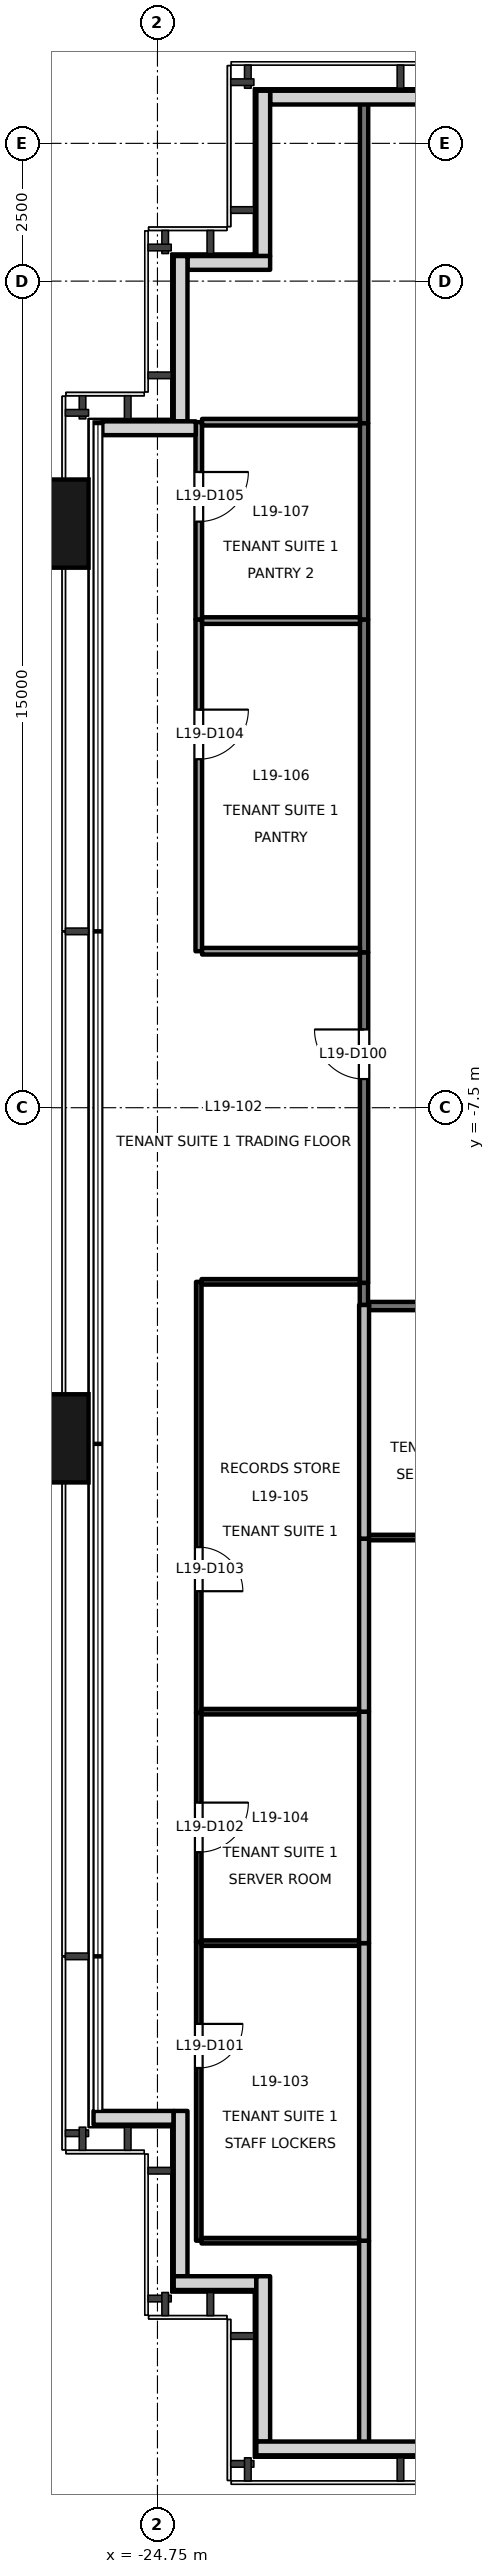
"""IFC4 building model, lengths in metres.
Left out: names, types, materials, properties, quantities, classifications, styles, units other than length and angle.
Written with IfcOpenShell. Run it as: python <this file> out.ifc"""

import sys

from ifc_helpers import new_model, si_unit, direction, frame, frame_2d, origin, origin_2d, place, context, subcontext, project, spatial, rectangle, extrude, element, fill, save


model = new_model("IFC4")
c1 = context("Model", 3, precision=1e-05, world=origin(), true_north=direction((0.0, 1.0)))
c2 = subcontext(c1, "Body", "Model", "MODEL_VIEW")
j1 = project(units=[si_unit("LENGTHUNIT", "METRE"), si_unit("PLANEANGLEUNIT", "RADIAN")], contexts=[c1])
p1 = place(None, origin())
s1 = spatial("IfcSite", under=j1, at=p1, CompositionType="ELEMENT")
p2 = place(p1, origin())
s2 = spatial("IfcBuilding", under=s1, at=p2, CompositionType="ELEMENT")
p3 = place(p2, frame((0.0, 0.0, 87.7)))
s3 = spatial("IfcBuildingStorey", under=s2, at=p3, CompositionType="ELEMENT", Elevation=87.7)
for number, where, z_axis, x_axis in (
    (1, (-26.9, -13.5, -0.2), (0.0, 0.0, 1.0), (0.0, 1.0, 0.0)),
    (2, (-26.9, 3.1, -0.2), (0.0, 0.0, 1.0), (0.0, 1.0, 0.0)),
):
    element("IfcColumn", number, at=place(p3, frame(where, z_axis=z_axis, x_axis=x_axis)), inside=s3, PredefinedType="COLUMN", context=c2, shape_type="SweptSolid", body=[
        extrude(rectangle(XDim=1.6, YDim=1.8, at=origin_2d()), origin(), (0.0, 0.0, 1.0), 4.0),
    ])
p4 = place(p3, frame((-20.0, 10.83, 0.0), z_axis=(0.0, 0.0, 1.0), x_axis=(-1.0, 0.0, 0.0)))
e3 = element("IfcWall", 3, at=p4, inside=s3, PredefinedType="SOLIDWALL", context=c2, shape_type="SweptSolid", body=[
    extrude(rectangle(XDim=2.705, YDim=0.25, at=frame_2d((1.353, 0.0))), origin(), (0.0, 0.0, 1.0), 3.8),
])
p5 = place(p3, frame((-22.83, 10.955, 0.0), z_axis=(0.0, 0.0, 1.0), x_axis=(0.0, -1.0, 0.0)))
e4 = element("IfcWall", 4, at=p5, inside=s3, PredefinedType="SOLIDWALL", context=c2, shape_type="SweptSolid", body=[
    extrude(rectangle(XDim=3.0, YDim=0.25, at=frame_2d((1.5, 0.0))), origin(), (0.0, 0.0, 1.0), 3.8),
])
p6 = place(p3, frame((-22.705, 7.83, 0.0), z_axis=(0.0, 0.0, 1.0), x_axis=(-1.0, 0.0, 0.0)))
e5 = element("IfcWall", 5, at=p6, inside=s3, PredefinedType="SOLIDWALL", context=c2, shape_type="SweptSolid", body=[
    extrude(rectangle(XDim=1.5, YDim=0.25, at=frame_2d((0.75, 0.0))), origin(), (0.0, 0.0, 1.0), 3.8),
])
p7 = place(p3, frame((-24.33, 7.955, 0.0), z_axis=(0.0, 0.0, 1.0), x_axis=(0.0, -1.0, 0.0)))
e6 = element("IfcWall", 6, at=p7, inside=s3, PredefinedType="SOLIDWALL", context=c2, shape_type="SweptSolid", body=[
    extrude(rectangle(XDim=3.0, YDim=0.25, at=frame_2d((1.5, 0.0))), origin(), (0.0, 0.0, 1.0), 3.8),
])
p8 = place(p3, frame((-24.055, 4.83, 0.0), z_axis=(0.0, 0.0, 1.0), x_axis=(-1.0, 0.0, 0.0)))
e7 = element("IfcWall", 7, at=p8, inside=s3, PredefinedType="SOLIDWALL", context=c2, shape_type="SweptSolid", body=[
    extrude(rectangle(XDim=1.695, YDim=0.25, at=frame_2d((0.848, 0.0))), origin(), (0.0, 0.0, 1.0), 3.8),
])
p9 = place(p3, frame((-25.91, -25.83, 0.0), z_axis=(0.0, 0.0, 1.0), x_axis=(1.0, 0.0, 0.0)))
e8 = element("IfcWall", 8, at=p9, inside=s3, PredefinedType="SOLIDWALL", context=c2, shape_type="SweptSolid", body=[
    extrude(rectangle(XDim=1.455, YDim=0.25, at=frame_2d((0.728, 0.0))), origin(), (0.0, 0.0, 1.0), 3.8),
])
p10 = place(p3, frame((-24.33, -25.705, 0.0), z_axis=(0.0, 0.0, 1.0), x_axis=(0.0, -1.0, 0.0)))
e9 = element("IfcWall", 9, at=p10, inside=s3, PredefinedType="SOLIDWALL", context=c2, shape_type="SweptSolid", body=[
    extrude(rectangle(XDim=3.0, YDim=0.25, at=frame_2d((1.5, 0.0))), origin(), (0.0, 0.0, 1.0), 3.8),
])
p11 = place(p3, frame((-24.455, -28.83, 0.0), z_axis=(0.0, 0.0, 1.0), x_axis=(1.0, 0.0, 0.0)))
e10 = element("IfcWall", 10, at=p11, inside=s3, PredefinedType="SOLIDWALL", context=c2, shape_type="SweptSolid", body=[
    extrude(rectangle(XDim=1.5, YDim=0.25, at=frame_2d((0.75, 0.0))), origin(), (0.0, 0.0, 1.0), 3.8),
])
p12 = place(p3, frame((-22.83, -28.705, 0.0), z_axis=(0.0, 0.0, 1.0), x_axis=(0.0, -1.0, 0.0)))
e11 = element("IfcWall", 11, at=p12, inside=s3, PredefinedType="SOLIDWALL", context=c2, shape_type="SweptSolid", body=[
    extrude(rectangle(XDim=3.0, YDim=0.25, at=frame_2d((1.5, 0.0))), origin(), (0.0, 0.0, 1.0), 3.8),
])
p13 = place(p3, frame((-22.955, -31.83, 0.0), z_axis=(0.0, 0.0, 1.0), x_axis=(1.0, 0.0, 0.0)))
e12 = element("IfcWall", 12, at=p13, inside=s3, PredefinedType="SOLIDWALL", context=c2, shape_type="SweptSolid", body=[
    extrude(rectangle(XDim=2.955, YDim=0.25, at=frame_2d((1.478, 0.0))), origin(), (0.0, 0.0, 1.0), 3.8),
])
p14 = place(p3, frame((-21.0, -10.68, 0.0), z_axis=(0.0, 0.0, 1.0), x_axis=(0.0, 1.0, 0.0)))
e13 = element("IfcWall", 13, at=p14, inside=s3, PredefinedType="PARTITIONING", context=c2, shape_type="SweptSolid", body=[
    extrude(rectangle(XDim=6.0, YDim=0.15, at=frame_2d((3.0, 0.0))), origin(), (0.0, 0.0, 1.0), 3.8),
])
p15 = place(p14, frame((3.7, 0.0, 0.0)))
e14 = element("IfcOpeningElement", 14, at=p15, cuts=e13, PredefinedType="OPENING", context=c2, shape_type="SweptSolid", body=[
    extrude(rectangle(XDim=0.9, YDim=2.1, at=frame_2d((0.45, 1.05))), frame((0.0, 0.085, 0.0), z_axis=(0.0, -1.0, 0.0), x_axis=(1.0, 0.0, 0.0)), (0.0, 0.0, 1.0), 0.171),
])
p16 = place(p3, frame((-21.0, 4.92, 0.0), z_axis=(0.0, 0.0, 1.0), x_axis=(0.0, 1.0, 0.0)))
e15 = element("IfcWall", 15, at=p16, inside=s3, PredefinedType="PARTITIONING", context=c2, shape_type="SweptSolid", body=[
    extrude(rectangle(XDim=5.82, YDim=0.15, at=frame_2d((2.91, 0.0))), origin(), (0.0, 0.0, 1.0), 3.8),
])
p17 = place(p3, frame((-21.003, -11.08, 0.0), z_axis=(0.0, 0.0, 1.0), x_axis=(0.0, 1.0, 0.0)))
e16 = element("IfcWall", 16, at=p17, inside=s3, PredefinedType="PARTITIONING", context=c2, shape_type="SweptSolid", body=[
    extrude(rectangle(XDim=0.4, YDim=0.15, at=frame_2d((0.2, 0.0))), origin(), (0.0, 0.0, 1.0), 3.8),
])
p18 = place(p3, frame((-21.0, -4.68, 0.0), z_axis=(0.0, 0.0, 1.0), x_axis=(0.0, 1.0, 0.0)))
e17 = element("IfcWall", 17, at=p18, inside=s3, PredefinedType="PARTITIONING", context=c2, shape_type="SweptSolid", body=[
    extrude(rectangle(XDim=6.04, YDim=0.15, at=frame_2d((3.02, 0.0))), origin(), (0.0, 0.0, 1.0), 3.4),
])
p19 = place(p3, frame((-21.0, 1.36, 0.0), z_axis=(0.0, 0.0, 1.0), x_axis=(0.0, 1.0, 0.0)))
e18 = element("IfcWall", 18, at=p19, inside=s3, PredefinedType="PARTITIONING", context=c2, shape_type="SweptSolid", body=[
    extrude(rectangle(XDim=3.56, YDim=0.15, at=frame_2d((1.78, 0.0))), origin(), (0.0, 0.0, 1.0), 3.4),
])
p20 = place(p3, frame((-18.02, -11.099, 0.0), z_axis=(0.0, 0.0, 1.0), x_axis=(-1.0, 0.0, 0.0)))
e19 = element("IfcWall", 19, at=p20, inside=s3, PredefinedType="PARTITIONING", context=c2, shape_type="SweptSolid", body=[
    extrude(rectangle(XDim=2.89, YDim=0.15, at=frame_2d((1.445, 0.0))), origin(), (0.0, 0.0, 1.0), 3.8),
])
p21 = place(p3, frame((-24.0, -22.64, 0.0), z_axis=(0.0, 0.0, 1.0), x_axis=(0.0, -1.0, 0.0)))
e20 = element("IfcWall", 20, at=p21, inside=s3, PredefinedType="PARTITIONING", context=c2, shape_type="SweptSolid", body=[
    extrude(rectangle(XDim=5.42, YDim=0.1, at=frame_2d((2.71, 0.0))), origin(), (0.0, 0.0, 1.0), 3.8),
])
p22 = place(p21, frame((1.486, 0.0, 0.0)))
e21 = element("IfcOpeningElement", 21, at=p22, cuts=e20, PredefinedType="OPENING", context=c2, shape_type="SweptSolid", body=[
    extrude(rectangle(XDim=0.8, YDim=2.1, at=frame_2d((0.4, 1.05))), frame((0.0, 0.061, 0.0), z_axis=(0.0, -1.0, 0.0), x_axis=(1.0, 0.0, 0.0)), (0.0, 0.0, 1.0), 0.121),
])
p23 = place(p3, frame((-23.95, -28.06, 0.0), z_axis=(0.0, 0.0, 1.0), x_axis=(1.0, 0.0, 0.0)))
e22 = element("IfcWall", 22, at=p23, inside=s3, PredefinedType="PARTITIONING", context=c2, shape_type="SweptSolid", body=[
    extrude(rectangle(XDim=2.86, YDim=0.1, at=frame_2d((1.43, 0.0))), origin(), (0.0, 0.0, 1.0), 3.8),
])
p24 = place(p3, frame((-24.0, -18.48, 0.0), z_axis=(0.0, 0.0, 1.0), x_axis=(0.0, -1.0, 0.0)))
e23 = element("IfcWall", 23, at=p24, inside=s3, PredefinedType="PARTITIONING", context=c2, shape_type="SweptSolid", body=[
    extrude(rectangle(XDim=4.16, YDim=0.1, at=frame_2d((2.08, 0.0))), origin(), (0.0, 0.0, 1.0), 3.8),
])
p25 = place(p24, frame((1.63, 0.0, 0.0)))
e24 = element("IfcOpeningElement", 24, at=p25, cuts=e23, PredefinedType="OPENING", context=c2, shape_type="SweptSolid", body=[
    extrude(rectangle(XDim=0.9, YDim=2.1, at=frame_2d((0.45, 1.05))), frame((0.0, 0.061, 0.0), z_axis=(0.0, -1.0, 0.0), x_axis=(1.0, 0.0, 0.0)), (0.0, 0.0, 1.0), 0.121),
])
p26 = place(p3, frame((-24.0, -10.66, 0.0), z_axis=(0.0, 0.0, 1.0), x_axis=(0.0, -1.0, 0.0)))
e25 = element("IfcWall", 25, at=p26, inside=s3, PredefinedType="PARTITIONING", context=c2, shape_type="SweptSolid", body=[
    extrude(rectangle(XDim=7.82, YDim=0.1, at=frame_2d((3.91, 0.0))), origin(), (0.0, 0.0, 1.0), 3.8),
])
p27 = place(p26, frame((4.814, 0.0, 0.0)))
e26 = element("IfcOpeningElement", 26, at=p27, cuts=e25, PredefinedType="OPENING", context=c2, shape_type="SweptSolid", body=[
    extrude(rectangle(XDim=0.8, YDim=2.1, at=frame_2d((0.4, 1.05))), frame((0.0, 0.061, 0.0), z_axis=(0.0, -1.0, 0.0), x_axis=(1.0, 0.0, 0.0)), (0.0, 0.0, 1.0), 0.121),
])
p28 = place(p3, frame((-21.075, -10.66, 0.0), z_axis=(0.0, 0.0, 1.0), x_axis=(-1.0, 0.0, 0.0)))
e27 = element("IfcWall", 27, at=p28, inside=s3, PredefinedType="PARTITIONING", context=c2, shape_type="SweptSolid", body=[
    extrude(rectangle(XDim=2.875, YDim=0.1, at=frame_2d((1.438, 0.0))), origin(), (0.0, 0.0, 1.0), 3.8),
])
p29 = place(p3, frame((-24.0, 1.36, 0.0), z_axis=(0.0, 0.0, 1.0), x_axis=(0.0, -1.0, 0.0)))
e28 = element("IfcWall", 28, at=p29, inside=s3, PredefinedType="PARTITIONING", context=c2, shape_type="SweptSolid", body=[
    extrude(rectangle(XDim=6.02, YDim=0.12, at=frame_2d((3.01, 0.0))), origin(), (0.0, 0.0, 1.0), 3.4),
])
p30 = place(p29, frame((1.636, 0.0, 0.0)))
e29 = element("IfcOpeningElement", 29, at=p30, cuts=e28, PredefinedType="OPENING", context=c2, shape_type="SweptSolid", body=[
    extrude(rectangle(XDim=0.9, YDim=2.1, at=frame_2d((0.45, 1.05))), frame((0.0, 0.071, 0.0), z_axis=(0.0, -1.0, 0.0), x_axis=(1.0, 0.0, 0.0)), (0.0, 0.0, 1.0), 0.141),
])
p31 = place(p3, frame((-23.94, -4.66, 0.0), z_axis=(0.0, 0.0, 1.0), x_axis=(1.0, 0.0, 0.0)))
e30 = element("IfcWall", 30, at=p31, inside=s3, PredefinedType="PARTITIONING", context=c2, shape_type="SweptSolid", body=[
    extrude(rectangle(XDim=2.865, YDim=0.12, at=frame_2d((1.433, 0.0))), origin(), (0.0, 0.0, 1.0), 3.8),
])
p32 = place(p3, frame((-24.0, 4.94, 0.0), z_axis=(0.0, 0.0, 1.0), x_axis=(0.0, -1.0, 0.0)))
e31 = element("IfcWall", 31, at=p32, inside=s3, PredefinedType="PARTITIONING", context=c2, shape_type="SweptSolid", body=[
    extrude(rectangle(XDim=3.58, YDim=0.12, at=frame_2d((1.79, 0.0))), origin(), (0.0, 0.0, 1.0), 3.4),
])
p33 = place(p32, frame((0.904, 0.0, 0.0)))
e32 = element("IfcOpeningElement", 32, at=p33, cuts=e31, PredefinedType="OPENING", context=c2, shape_type="SweptSolid", body=[
    extrude(rectangle(XDim=0.9, YDim=2.1, at=frame_2d((0.45, 1.05))), frame((0.0, 0.071, 0.0), z_axis=(0.0, -1.0, 0.0), x_axis=(1.0, 0.0, 0.0)), (0.0, 0.0, 1.0), 0.141),
])
p34 = place(p3, frame((-21.075, 4.94, 0.0), z_axis=(0.0, 0.0, 1.0), x_axis=(-1.0, 0.0, 0.0)))
e33 = element("IfcWall", 33, at=p34, inside=s3, PredefinedType="PARTITIONING", context=c2, shape_type="SweptSolid", body=[
    extrude(rectangle(XDim=2.865, YDim=0.12, at=frame_2d((1.433, 0.0))), origin(), (0.0, 0.0, 1.0), 3.8),
])
p35 = place(p3, frame((-21.0, -28.06, 0.0), z_axis=(0.0, 0.0, 1.0), x_axis=(0.0, -1.0, 0.0)))
e34 = element("IfcWall", 34, at=p35, inside=s3, PredefinedType="PARTITIONING", context=c2, shape_type="SweptSolid", body=[
    extrude(rectangle(XDim=3.68, YDim=0.18, at=frame_2d((1.84, 0.0))), origin(), (0.0, 0.0, 1.0), 3.8),
])
p36 = place(p3, frame((-23.95, -22.66, 0.0), z_axis=(0.0, 0.0, 1.0), x_axis=(1.0, 0.0, 0.0)))
e35 = element("IfcWall", 35, at=p36, inside=s3, PredefinedType="PARTITIONING", context=c2, shape_type="SweptSolid", body=[
    extrude(rectangle(XDim=2.86, YDim=0.1, at=frame_2d((1.43, 0.0))), origin(), (0.0, 0.0, 1.0), 3.8),
])
p37 = place(p3, frame((-21.0, -22.66, 0.0), z_axis=(0.0, 0.0, 1.0), x_axis=(0.0, -1.0, 0.0)))
e36 = element("IfcWall", 36, at=p37, inside=s3, PredefinedType="PARTITIONING", context=c2, shape_type="SweptSolid", body=[
    extrude(rectangle(XDim=5.4, YDim=0.18, at=frame_2d((2.7, 0.0))), origin(), (0.0, 0.0, 1.0), 3.8),
])
p38 = place(p3, frame((-23.95, -18.46, 0.0), z_axis=(0.0, 0.0, 1.0), x_axis=(1.0, 0.0, 0.0)))
e37 = element("IfcWall", 37, at=p38, inside=s3, PredefinedType="PARTITIONING", context=c2, shape_type="SweptSolid", body=[
    extrude(rectangle(XDim=2.86, YDim=0.1, at=frame_2d((1.43, 0.0))), origin(), (0.0, 0.0, 1.0), 3.8),
])
p39 = place(p3, frame((-21.0, -18.46, 0.0), z_axis=(0.0, 0.0, 1.0), x_axis=(0.0, -1.0, 0.0)))
e38 = element("IfcWall", 38, at=p39, inside=s3, PredefinedType="PARTITIONING", context=c2, shape_type="SweptSolid", body=[
    extrude(rectangle(XDim=4.2, YDim=0.18, at=frame_2d((2.1, 0.0))), origin(), (0.0, 0.0, 1.0), 3.8),
])
p40 = place(p3, frame((-21.0, -15.32, 0.0), z_axis=(0.0, 0.0, 1.0), x_axis=(0.0, -1.0, 0.0)))
e39 = element("IfcWall", 39, at=p40, inside=s3, PredefinedType="PARTITIONING", context=c2, shape_type="SweptSolid", body=[
    extrude(rectangle(XDim=3.14, YDim=0.18, at=frame_2d((1.57, 0.0))), origin(), (0.0, 0.0, 1.0), 3.8),
])
p41 = place(p3, frame((-21.0, -11.08, 0.0), z_axis=(0.0, 0.0, 1.0), x_axis=(0.0, -1.0, 0.0)))
e40 = element("IfcWall", 40, at=p41, inside=s3, PredefinedType="PARTITIONING", context=c2, shape_type="SweptSolid", body=[
    extrude(rectangle(XDim=4.24, YDim=0.18, at=frame_2d((2.12, 0.0))), origin(), (0.0, 0.0, 1.0), 3.8),
])
p42 = place(p3, frame((-23.94, 1.34, 0.0), z_axis=(0.0, 0.0, 1.0), x_axis=(1.0, 0.0, 0.0)))
e41 = element("IfcWall", 41, at=p42, inside=s3, PredefinedType="PARTITIONING", context=c2, shape_type="SweptSolid", body=[
    extrude(rectangle(XDim=2.865, YDim=0.12, at=frame_2d((1.433, 0.0))), origin(), (0.0, 0.0, 1.0), 3.8),
])
p43 = place(p3, frame((-20.91, -15.3, 0.0), z_axis=(0.0, 0.0, 1.0), x_axis=(1.0, 0.0, 0.0)))
e42 = element("IfcWall", 42, at=p43, inside=s3, PredefinedType="PARTITIONING", context=c2, shape_type="SweptSolid", body=[
    extrude(rectangle(XDim=2.86, YDim=0.1, at=frame_2d((1.43, 0.0))), origin(), (0.0, 0.0, 1.0), 3.8),
])
p44 = place(p15, origin())
e43 = element("IfcDoor", 43, at=p44, inside=s3, OperationType="SINGLE_SWING_RIGHT", PredefinedType="DOOR", context=c2, shape_type="SweptSolid", body=[
    extrude(rectangle(XDim=0.9, YDim=2.1, at=frame_2d((0.45, 1.05))), frame((0.0, 0.025, 0.0), z_axis=(0.0, -1.0, 0.0), x_axis=(1.0, 0.0, 0.0)), (0.0, 0.0, 1.0), 0.05),
])
fill(e14, e43)
p45 = place(p22, origin())
e44 = element("IfcDoor", 44, at=p45, inside=s3, OperationType="SINGLE_SWING_LEFT", PredefinedType="DOOR", context=c2, shape_type="SweptSolid", body=[
    extrude(rectangle(XDim=0.8, YDim=2.1, at=frame_2d((0.4, 1.05))), frame((0.0, 0.025, 0.0), z_axis=(0.0, -1.0, 0.0), x_axis=(1.0, 0.0, 0.0)), (0.0, 0.0, 1.0), 0.05),
])
fill(e21, e44)
p46 = place(p25, origin())
e45 = element("IfcDoor", 45, at=p46, inside=s3, OperationType="SINGLE_SWING_LEFT", PredefinedType="DOOR", context=c2, shape_type="SweptSolid", body=[
    extrude(rectangle(XDim=0.9, YDim=2.1, at=frame_2d((0.45, 1.05))), frame((0.0, 0.025, 0.0), z_axis=(0.0, -1.0, 0.0), x_axis=(1.0, 0.0, 0.0)), (0.0, 0.0, 1.0), 0.05),
])
fill(e24, e45)
p47 = place(p27, origin())
e46 = element("IfcDoor", 46, at=p47, inside=s3, OperationType="SINGLE_SWING_RIGHT", PredefinedType="DOOR", context=c2, shape_type="SweptSolid", body=[
    extrude(rectangle(XDim=0.8, YDim=2.1, at=frame_2d((0.4, 1.05))), frame((0.0, 0.025, 0.0), z_axis=(0.0, -1.0, 0.0), x_axis=(1.0, 0.0, 0.0)), (0.0, 0.0, 1.0), 0.05),
])
fill(e26, e46)
p48 = place(p30, origin())
e47 = element("IfcDoor", 47, at=p48, inside=s3, OperationType="SINGLE_SWING_LEFT", PredefinedType="DOOR", context=c2, shape_type="SweptSolid", body=[
    extrude(rectangle(XDim=0.9, YDim=2.1, at=frame_2d((0.45, 1.05))), frame((0.0, 0.025, 0.0), z_axis=(0.0, -1.0, 0.0), x_axis=(1.0, 0.0, 0.0)), (0.0, 0.0, 1.0), 0.05),
])
fill(e29, e47)
p49 = place(p33, origin())
e48 = element("IfcDoor", 48, at=p49, inside=s3, OperationType="SINGLE_SWING_LEFT", PredefinedType="DOOR", context=c2, shape_type="SweptSolid", body=[
    extrude(rectangle(XDim=0.9, YDim=2.1, at=frame_2d((0.45, 1.05))), frame((0.0, 0.025, 0.0), z_axis=(0.0, -1.0, 0.0), x_axis=(1.0, 0.0, 0.0)), (0.0, 0.0, 1.0), 0.05),
])
fill(e32, e48)
save(model, sys.argv[1])
